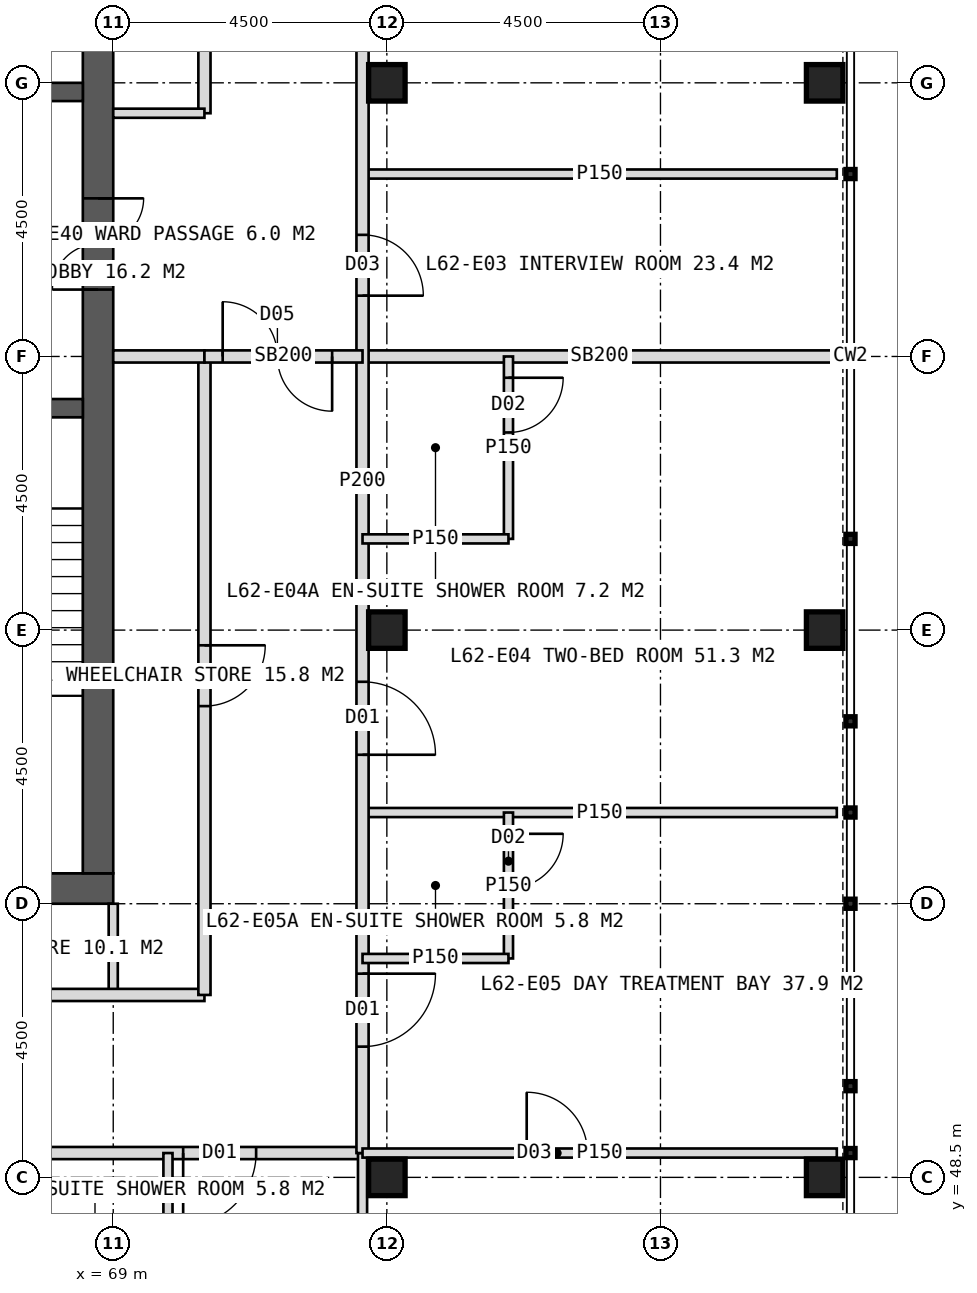
"""IFC4 building model, lengths in metres.
Left out: names, types, materials, properties, quantities, classifications, styles, units other than length and angle.
Written with IfcOpenShell. Run it as: python <this file> out.ifc"""

import sys

from ifc_helpers import new_model, si_unit, direction, frame, frame_2d, origin, origin_2d, place, context, subcontext, project, spatial, rectangle, hollow_rectangle, extrude, element, fill, save


model = new_model("IFC4")
c1 = context("Model", 3, precision=1e-05, world=origin(), true_north=direction((0.0, 1.0)))
c2 = subcontext(c1, "Body", "Model", "MODEL_VIEW")
j1 = project(units=[si_unit("LENGTHUNIT", "METRE"), si_unit("PLANEANGLEUNIT", "RADIAN")], contexts=[c1])
p1 = place(None, origin())
s1 = spatial("IfcSite", under=j1, at=p1, CompositionType="ELEMENT")
p2 = place(p1, origin())
s2 = spatial("IfcBuilding", under=s1, at=p2, CompositionType="ELEMENT")
p3 = place(p2, frame((0.0, 0.0, 258.0)))
s3 = spatial("IfcBuildingStorey", under=s2, at=p3, CompositionType="ELEMENT", Elevation=258.0)
p4 = place(p3, frame((51.0, 53.25, 0.0), z_axis=(0.0, 0.0, 1.0), x_axis=(1.0, 0.0, 0.0)))
e1 = element("IfcWall", 1, at=p4, inside=s3, PredefinedType="SHEAR", context=c2, shape_type="SweptSolid", body=[
    extrude(rectangle(XDim=18.0, YDim=0.5, at=frame_2d((9.0, 0.0))), origin(), (0.0, 0.0, 1.0), 4.0),
])
p5 = place(p4, frame((8.1, 0.0, 0.0)))
e2 = element("IfcOpeningElement", 2, at=p5, cuts=e1, PredefinedType="OPENING", context=c2, shape_type="SweptSolid", body=[
    extrude(rectangle(XDim=1.8, YDim=2.2, at=frame_2d((0.9, 1.1))), frame((0.0, 0.26, 0.0), z_axis=(0.0, -1.0, 0.0), x_axis=(1.0, 0.0, 0.0)), (0.0, 0.0, 1.0), 0.52),
])
p6 = place(p3, frame((68.75, 53.5, 0.0), z_axis=(0.0, 0.0, 1.0), x_axis=(0.0, 1.0, 0.0)))
e3 = element("IfcWall", 3, at=p6, inside=s3, PredefinedType="SHEAR", context=c2, shape_type="SweptSolid", body=[
    extrude(rectangle(XDim=17.0, YDim=0.5, at=frame_2d((8.5, 0.0))), origin(), (0.0, 0.0, 1.0), 4.0),
])
p7 = place(p6, frame((9.6, 0.0, 0.0)))
e4 = element("IfcOpeningElement", 4, at=p7, cuts=e3, PredefinedType="OPENING", context=c2, shape_type="SweptSolid", body=[
    extrude(rectangle(XDim=1.5, YDim=2.2, at=frame_2d((0.75, 1.1))), frame((0.0, 0.26, 0.0), z_axis=(0.0, -1.0, 0.0), x_axis=(1.0, 0.0, 0.0)), (0.0, 0.0, 1.0), 0.52),
])
p8 = place(p3, frame((65.2, 61.15, 0.0), z_axis=(0.0, 0.0, 1.0), x_axis=(1.0, 0.0, 0.0)))
e5 = element("IfcWall", 5, at=p8, inside=s3, PredefinedType="SHEAR", context=c2, shape_type="SweptSolid", body=[
    extrude(rectangle(XDim=3.3, YDim=0.3, at=frame_2d((1.65, 0.0))), origin(), (0.0, 0.0, 1.0), 4.0),
])
p9 = place(p8, frame((1.05, 0.0, 0.0)))
e6 = element("IfcOpeningElement", 6, at=p9, cuts=e5, PredefinedType="OPENING", context=c2, shape_type="SweptSolid", body=[
    extrude(rectangle(XDim=1.2, YDim=2.1, at=frame_2d((0.6, 1.05))), frame((0.0, 0.16, 0.0), z_axis=(0.0, -1.0, 0.0), x_axis=(1.0, 0.0, 0.0)), (0.0, 0.0, 1.0), 0.32),
])
p10 = place(p3, frame((65.2, 66.35, 0.0), z_axis=(0.0, 0.0, 1.0), x_axis=(1.0, 0.0, 0.0)))
e7 = element("IfcWall", 7, at=p10, inside=s3, PredefinedType="SHEAR", context=c2, shape_type="SweptSolid", body=[
    extrude(rectangle(XDim=3.3, YDim=0.3, at=frame_2d((1.65, 0.0))), origin(), (0.0, 0.0, 1.0), 4.0),
])
p11 = place(p10, frame((1.05, 0.0, 0.0)))
e8 = element("IfcOpeningElement", 8, at=p11, cuts=e7, PredefinedType="OPENING", context=c2, shape_type="SweptSolid", body=[
    extrude(rectangle(XDim=1.2, YDim=2.2, at=frame_2d((0.6, 1.1))), frame((0.0, 0.16, 0.0), z_axis=(0.0, -1.0, 0.0), x_axis=(1.0, 0.0, 0.0)), (0.0, 0.0, 1.0), 0.32),
])
for number, where, z_axis, x_axis in (
    (9, (73.5, 48.5, 0.0), (0.0, 0.0, 1.0), (1.0, 0.0, 0.0)),
    (10, (73.5, 57.5, 0.0), (0.0, 0.0, 1.0), (1.0, 0.0, 0.0)),
    (11, (73.5, 66.5, 0.0), (0.0, 0.0, 1.0), (1.0, 0.0, 0.0)),
    (12, (80.7, 48.5, 0.0), (0.0, 0.0, 1.0), (1.0, 0.0, 0.0)),
    (13, (80.7, 57.5, 0.0), (0.0, 0.0, 1.0), (1.0, 0.0, 0.0)),
    (14, (80.7, 66.5, 0.0), (0.0, 0.0, 1.0), (1.0, 0.0, 0.0)),
):
    element("IfcColumn", number, at=place(p3, frame(where, z_axis=z_axis, x_axis=x_axis)), inside=s3, PredefinedType="COLUMN", context=c2, shape_type="SweptSolid", body=[
        extrude(hollow_rectangle(XDim=0.6, YDim=0.6, WallThickness=0.04, at=origin_2d()), origin(), (0.0, 0.0, 1.0), 4.0),
    ])
p12 = place(p3, frame((73.1, 48.9, 0.0), z_axis=(0.0, 0.0, 1.0), x_axis=(-1.0, 0.0, 0.0)))
e15 = element("IfcWall", 15, at=p12, inside=s3, PredefinedType="PARTITIONING", context=c2, shape_type="SweptSolid", body=[
    extrude(rectangle(XDim=26.2, YDim=0.2, at=frame_2d((13.1, 0.0))), origin(), (0.0, 0.0, 1.0), 3.75),
])
p13 = place(p12, frame((1.75, 0.0, 0.0)))
e16 = element("IfcOpeningElement", 16, at=p13, cuts=e15, PredefinedType="OPENING", context=c2, shape_type="SweptSolid", body=[
    extrude(rectangle(XDim=1.2, YDim=2.2, at=frame_2d((0.6, 1.1))), frame((0.0, 0.11, 0.0), z_axis=(0.0, -1.0, 0.0), x_axis=(1.0, 0.0, 0.0)), (0.0, 0.0, 1.0), 0.22),
])
p14 = place(p12, frame((6.75, 0.0, 0.0)))
e17 = element("IfcOpeningElement", 17, at=p14, cuts=e15, PredefinedType="OPENING", context=c2, shape_type="SweptSolid", body=[
    extrude(rectangle(XDim=1.0, YDim=2.1, at=frame_2d((0.5, 1.05))), frame((0.0, 0.11, 0.0), z_axis=(0.0, -1.0, 0.0), x_axis=(1.0, 0.0, 0.0)), (0.0, 0.0, 1.0), 0.22),
])
p15 = place(p12, frame((11.1, 0.0, 0.0)))
e18 = element("IfcOpeningElement", 18, at=p15, cuts=e15, PredefinedType="OPENING", context=c2, shape_type="SweptSolid", body=[
    extrude(rectangle(XDim=1.0, YDim=2.1, at=frame_2d((0.5, 1.05))), frame((0.0, 0.11, 0.0), z_axis=(0.0, -1.0, 0.0), x_axis=(1.0, 0.0, 0.0)), (0.0, 0.0, 1.0), 0.22),
])
p16 = place(p12, frame((14.1, 0.0, 0.0)))
e19 = element("IfcOpeningElement", 19, at=p16, cuts=e15, PredefinedType="OPENING", context=c2, shape_type="SweptSolid", body=[
    extrude(rectangle(XDim=1.0, YDim=2.1, at=frame_2d((0.5, 1.05))), frame((0.0, 0.11, 0.0), z_axis=(0.0, -1.0, 0.0), x_axis=(1.0, 0.0, 0.0)), (0.0, 0.0, 1.0), 0.22),
])
p17 = place(p12, frame((18.45, 0.0, 0.0)))
e20 = element("IfcOpeningElement", 20, at=p17, cuts=e15, PredefinedType="OPENING", context=c2, shape_type="SweptSolid", body=[
    extrude(rectangle(XDim=1.0, YDim=2.1, at=frame_2d((0.5, 1.05))), frame((0.0, 0.11, 0.0), z_axis=(0.0, -1.0, 0.0), x_axis=(1.0, 0.0, 0.0)), (0.0, 0.0, 1.0), 0.22),
])
p18 = place(p12, frame((22.9, 0.0, 0.0)))
e21 = element("IfcOpeningElement", 21, at=p18, cuts=e15, PredefinedType="OPENING", context=c2, shape_type="SweptSolid", body=[
    extrude(rectangle(XDim=1.0, YDim=2.1, at=frame_2d((0.5, 1.05))), frame((0.0, 0.11, 0.0), z_axis=(0.0, -1.0, 0.0), x_axis=(1.0, 0.0, 0.0)), (0.0, 0.0, 1.0), 0.22),
])
p19 = place(p3, frame((73.1, 48.9, 0.0), z_axis=(0.0, 0.0, 1.0), x_axis=(0.0, -1.0, 0.0)))
e22 = element("IfcWall", 22, at=p19, inside=s3, PredefinedType="PARTITIONING", context=c2, shape_type="SweptSolid", body=[
    extrude(rectangle(XDim=7.8, YDim=0.15, at=frame_2d((3.9, 0.0))), origin(), (0.0, 0.0, 1.0), 3.75),
])
p20 = place(p3, frame((69.9, 48.9, 0.0), z_axis=(0.0, 0.0, 1.0), x_axis=(0.0, -1.0, 0.0)))
e23 = element("IfcWall", 23, at=p20, inside=s3, PredefinedType="PARTITIONING", context=c2, shape_type="SweptSolid", body=[
    extrude(rectangle(XDim=2.4, YDim=0.15, at=frame_2d((1.2, 0.0))), origin(), (0.0, 0.0, 1.0), 3.75),
])
p21 = place(p3, frame((69.0, 53.0, 0.0), z_axis=(0.0, 0.0, 1.0), x_axis=(0.0, -1.0, 0.0)))
e24 = element("IfcWall", 24, at=p21, inside=s3, PredefinedType="PARTITIONING", context=c2, shape_type="SweptSolid", body=[
    extrude(rectangle(XDim=1.5, YDim=0.15, at=frame_2d((0.75, 0.0))), origin(), (0.0, 0.0, 1.0), 3.75),
])
p22 = place(p3, frame((70.5, 51.5, 0.0), z_axis=(0.0, 0.0, 1.0), x_axis=(-1.0, 0.0, 0.0)))
e25 = element("IfcWall", 25, at=p22, inside=s3, PredefinedType="PARTITIONING", context=c2, shape_type="SweptSolid", body=[
    extrude(rectangle(XDim=8.25, YDim=0.2, at=frame_2d((4.125, 0.0))), origin(), (0.0, 0.0, 1.0), 3.75),
])
p23 = place(p22, frame((4.375, 0.0, 0.0)))
e26 = element("IfcOpeningElement", 26, at=p23, cuts=e25, PredefinedType="OPENING", context=c2, shape_type="SweptSolid", body=[
    extrude(rectangle(XDim=1.0, YDim=2.1, at=frame_2d((0.5, 1.05))), frame((0.0, 0.11, 0.0), z_axis=(0.0, -1.0, 0.0), x_axis=(1.0, 0.0, 0.0)), (0.0, 0.0, 1.0), 0.22),
])
p24 = place(p3, frame((73.1, 65.0, 0.0), z_axis=(0.0, 0.0, 1.0), x_axis=(1.0, 0.0, 0.0)))
e27 = element("IfcWall", 27, at=p24, inside=s3, PredefinedType="PARTITIONING", context=c2, shape_type="SweptSolid", body=[
    extrude(rectangle(XDim=7.8, YDim=0.15, at=frame_2d((3.9, 0.0))), origin(), (0.0, 0.0, 1.0), 3.75),
])
p25 = place(p3, frame((73.1, 62.0, 0.0), z_axis=(0.0, 0.0, 1.0), x_axis=(1.0, 0.0, 0.0)))
e28 = element("IfcWall", 28, at=p25, inside=s3, PredefinedType="SOLIDWALL", context=c2, shape_type="SweptSolid", body=[
    extrude(rectangle(XDim=7.8, YDim=0.2, at=frame_2d((3.9, 0.0))), origin(), (0.0, 0.0, 1.0), 2.75),
])
p26 = place(p3, frame((73.1, 54.5, 0.0), z_axis=(0.0, 0.0, 1.0), x_axis=(1.0, 0.0, 0.0)))
e29 = element("IfcWall", 29, at=p26, inside=s3, PredefinedType="PARTITIONING", context=c2, shape_type="SweptSolid", body=[
    extrude(rectangle(XDim=7.8, YDim=0.15, at=frame_2d((3.9, 0.0))), origin(), (0.0, 0.0, 1.0), 3.75),
])
p27 = place(p3, frame((73.1, 71.0, 0.0), z_axis=(0.0, 0.0, 1.0), x_axis=(0.0, -1.0, 0.0)))
e30 = element("IfcWall", 30, at=p27, inside=s3, PredefinedType="PARTITIONING", context=c2, shape_type="SweptSolid", body=[
    extrude(rectangle(XDim=22.1, YDim=0.2, at=frame_2d((11.05, 0.0))), origin(), (0.0, 0.0, 1.0), 3.75),
])
p28 = place(p27, frame((2.65, 0.0, 0.0)))
e31 = element("IfcOpeningElement", 31, at=p28, cuts=e30, PredefinedType="OPENING", context=c2, shape_type="SweptSolid", body=[
    extrude(rectangle(XDim=1.0, YDim=2.1, at=frame_2d((0.5, 1.05))), frame((0.0, 0.11, 0.0), z_axis=(0.0, -1.0, 0.0), x_axis=(1.0, 0.0, 0.0)), (0.0, 0.0, 1.0), 0.22),
])
p29 = place(p27, frame((7.0, 0.0, 0.0)))
e32 = element("IfcOpeningElement", 32, at=p29, cuts=e30, PredefinedType="OPENING", context=c2, shape_type="SweptSolid", body=[
    extrude(rectangle(XDim=1.0, YDim=2.1, at=frame_2d((0.5, 1.05))), frame((0.0, 0.11, 0.0), z_axis=(0.0, -1.0, 0.0), x_axis=(1.0, 0.0, 0.0)), (0.0, 0.0, 1.0), 0.22),
])
p30 = place(p27, frame((14.35, 0.0, 0.0)))
e33 = element("IfcOpeningElement", 33, at=p30, cuts=e30, PredefinedType="OPENING", context=c2, shape_type="SweptSolid", body=[
    extrude(rectangle(XDim=1.2, YDim=2.2, at=frame_2d((0.6, 1.1))), frame((0.0, 0.11, 0.0), z_axis=(0.0, -1.0, 0.0), x_axis=(1.0, 0.0, 0.0)), (0.0, 0.0, 1.0), 0.22),
])
p31 = place(p27, frame((19.15, 0.0, 0.0)))
e34 = element("IfcOpeningElement", 34, at=p31, cuts=e30, PredefinedType="OPENING", context=c2, shape_type="SweptSolid", body=[
    extrude(rectangle(XDim=1.2, YDim=2.2, at=frame_2d((0.6, 1.1))), frame((0.0, 0.11, 0.0), z_axis=(0.0, -1.0, 0.0), x_axis=(1.0, 0.0, 0.0)), (0.0, 0.0, 1.0), 0.22),
])
p32 = place(p3, frame((75.5, 62.0, 0.0), z_axis=(0.0, 0.0, 1.0), x_axis=(0.0, -1.0, 0.0)))
e35 = element("IfcWall", 35, at=p32, inside=s3, PredefinedType="PARTITIONING", context=c2, shape_type="SweptSolid", body=[
    extrude(rectangle(XDim=3.0, YDim=0.15, at=frame_2d((1.5, 0.0))), origin(), (0.0, 0.0, 1.0), 3.75),
])
p33 = place(p32, frame((0.35, 0.0, 0.0)))
e36 = element("IfcOpeningElement", 36, at=p33, cuts=e35, PredefinedType="OPENING", context=c2, shape_type="SweptSolid", body=[
    extrude(rectangle(XDim=0.9, YDim=2.1, at=frame_2d((0.45, 1.05))), frame((0.0, 0.085, 0.0), z_axis=(0.0, -1.0, 0.0), x_axis=(1.0, 0.0, 0.0)), (0.0, 0.0, 1.0), 0.17),
])
p34 = place(p3, frame((73.1, 59.0, 0.0), z_axis=(0.0, 0.0, 1.0), x_axis=(1.0, 0.0, 0.0)))
e37 = element("IfcWall", 37, at=p34, inside=s3, PredefinedType="PARTITIONING", context=c2, shape_type="SweptSolid", body=[
    extrude(rectangle(XDim=2.4, YDim=0.15, at=frame_2d((1.2, 0.0))), origin(), (0.0, 0.0, 1.0), 3.75),
])
p35 = place(p3, frame((73.1, 48.9, 0.0), z_axis=(0.0, 0.0, 1.0), x_axis=(1.0, 0.0, 0.0)))
e38 = element("IfcWall", 38, at=p35, inside=s3, PredefinedType="PARTITIONING", context=c2, shape_type="SweptSolid", body=[
    extrude(rectangle(XDim=7.8, YDim=0.15, at=frame_2d((3.9, 0.0))), origin(), (0.0, 0.0, 1.0), 3.75),
])
p36 = place(p35, frame((2.7, 0.0, 0.0)))
e39 = element("IfcOpeningElement", 39, at=p36, cuts=e38, PredefinedType="OPENING", context=c2, shape_type="SweptSolid", body=[
    extrude(rectangle(XDim=1.0, YDim=2.1, at=frame_2d((0.5, 1.05))), frame((0.0, 0.085, 0.0), z_axis=(0.0, -1.0, 0.0), x_axis=(1.0, 0.0, 0.0)), (0.0, 0.0, 1.0), 0.17),
])
p37 = place(p3, frame((75.5, 54.5, 0.0), z_axis=(0.0, 0.0, 1.0), x_axis=(0.0, -1.0, 0.0)))
e40 = element("IfcWall", 40, at=p37, inside=s3, PredefinedType="PARTITIONING", context=c2, shape_type="SweptSolid", body=[
    extrude(rectangle(XDim=2.4, YDim=0.15, at=frame_2d((1.2, 0.0))), origin(), (0.0, 0.0, 1.0), 3.75),
])
p38 = place(p37, frame((0.35, 0.0, 0.0)))
e41 = element("IfcOpeningElement", 41, at=p38, cuts=e40, PredefinedType="OPENING", context=c2, shape_type="SweptSolid", body=[
    extrude(rectangle(XDim=0.9, YDim=2.1, at=frame_2d((0.45, 1.05))), frame((0.0, 0.085, 0.0), z_axis=(0.0, -1.0, 0.0), x_axis=(1.0, 0.0, 0.0)), (0.0, 0.0, 1.0), 0.17),
])
p39 = place(p3, frame((73.1, 52.1, 0.0), z_axis=(0.0, 0.0, 1.0), x_axis=(1.0, 0.0, 0.0)))
e42 = element("IfcWall", 42, at=p39, inside=s3, PredefinedType="PARTITIONING", context=c2, shape_type="SweptSolid", body=[
    extrude(rectangle(XDim=2.4, YDim=0.15, at=frame_2d((1.2, 0.0))), origin(), (0.0, 0.0, 1.0), 3.75),
])
p40 = place(p3, frame((70.5, 72.5, 0.0), z_axis=(0.0, 0.0, 1.0), x_axis=(0.0, -1.0, 0.0)))
e43 = element("IfcWall", 43, at=p40, inside=s3, PredefinedType="PARTITIONING", context=c2, shape_type="SweptSolid", body=[
    extrude(rectangle(XDim=6.5, YDim=0.2, at=frame_2d((3.25, 0.0))), origin(), (0.0, 0.0, 1.0), 3.75),
])
p41 = place(p40, frame((3.5, 0.0, 0.0)))
e44 = element("IfcOpeningElement", 44, at=p41, cuts=e43, PredefinedType="OPENING", context=c2, shape_type="SweptSolid", body=[
    extrude(rectangle(XDim=1.0, YDim=2.1, at=frame_2d((0.5, 1.05))), frame((0.0, 0.11, 0.0), z_axis=(0.0, -1.0, 0.0), x_axis=(1.0, 0.0, 0.0)), (0.0, 0.0, 1.0), 0.22),
])
p42 = place(p3, frame((70.5, 62.0, 0.0), z_axis=(0.0, 0.0, 1.0), x_axis=(0.0, -1.0, 0.0)))
e45 = element("IfcWall", 45, at=p42, inside=s3, PredefinedType="PARTITIONING", context=c2, shape_type="SweptSolid", body=[
    extrude(rectangle(XDim=10.5, YDim=0.2, at=frame_2d((5.25, 0.0))), origin(), (0.0, 0.0, 1.0), 3.75),
])
p43 = place(p42, frame((4.75, 0.0, 0.0)))
e46 = element("IfcOpeningElement", 46, at=p43, cuts=e45, PredefinedType="OPENING", context=c2, shape_type="SweptSolid", body=[
    extrude(rectangle(XDim=1.0, YDim=2.1, at=frame_2d((0.5, 1.05))), frame((0.0, 0.11, 0.0), z_axis=(0.0, -1.0, 0.0), x_axis=(1.0, 0.0, 0.0)), (0.0, 0.0, 1.0), 0.22),
])
p44 = place(p3, frame((69.0, 66.0, 0.0), z_axis=(0.0, 0.0, 1.0), x_axis=(1.0, 0.0, 0.0)))
e47 = element("IfcWall", 47, at=p44, inside=s3, PredefinedType="PARTITIONING", context=c2, shape_type="SweptSolid", body=[
    extrude(rectangle(XDim=1.5, YDim=0.15, at=frame_2d((0.75, 0.0))), origin(), (0.0, 0.0, 1.0), 3.75),
])
p45 = place(p3, frame((69.0, 62.0, 0.0), z_axis=(0.0, 0.0, 1.0), x_axis=(1.0, 0.0, 0.0)))
e48 = element("IfcWall", 48, at=p45, inside=s3, PredefinedType="SOLIDWALL", context=c2, shape_type="SweptSolid", body=[
    extrude(rectangle(XDim=1.5, YDim=0.2, at=frame_2d((0.75, 0.0))), origin(), (0.0, 0.0, 1.0), 2.75),
])
p46 = place(p3, frame((70.5, 62.0, 0.0), z_axis=(0.0, 0.0, 1.0), x_axis=(1.0, 0.0, 0.0)))
e49 = element("IfcWall", 49, at=p46, inside=s3, PredefinedType="SOLIDWALL", context=c2, shape_type="SweptSolid", body=[
    extrude(rectangle(XDim=2.6, YDim=0.2, at=frame_2d((1.3, 0.0))), origin(), (0.0, 0.0, 1.0), 2.75),
])
p47 = place(p46, frame((0.3, 0.0, 0.0)))
e50 = element("IfcOpeningElement", 50, at=p47, cuts=e49, PredefinedType="OPENING", context=c2, shape_type="SweptSolid", body=[
    extrude(rectangle(XDim=1.8, YDim=2.2, at=frame_2d((0.9, 1.1))), frame((0.0, 0.11, 0.0), z_axis=(0.0, -1.0, 0.0), x_axis=(1.0, 0.0, 0.0)), (0.0, 0.0, 1.0), 0.22),
])
p48 = place(p13, origin())
e51 = element("IfcDoor", 51, at=p48, inside=s3, OperationType="SINGLE_SWING_RIGHT", PredefinedType="DOOR", context=c2, shape_type="SweptSolid", body=[
    extrude(rectangle(XDim=1.2, YDim=2.2, at=frame_2d((0.6, 1.1))), frame((0.0, 0.025, 0.0), z_axis=(0.0, -1.0, 0.0), x_axis=(1.0, 0.0, 0.0)), (0.0, 0.0, 1.0), 0.05),
])
fill(e16, e51)
p49 = place(p29, origin())
e52 = element("IfcDoor", 52, at=p49, inside=s3, OperationType="SINGLE_SWING_RIGHT", PredefinedType="DOOR", context=c2, shape_type="SweptSolid", body=[
    extrude(rectangle(XDim=1.0, YDim=2.1, at=frame_2d((0.5, 1.05))), frame((0.0, 0.025, 0.0), z_axis=(0.0, -1.0, 0.0), x_axis=(1.0, 0.0, 0.0)), (0.0, 0.0, 1.0), 0.05),
])
fill(e32, e52)
p50 = place(p30, origin())
e53 = element("IfcDoor", 53, at=p50, inside=s3, OperationType="SINGLE_SWING_RIGHT", PredefinedType="DOOR", context=c2, shape_type="SweptSolid", body=[
    extrude(rectangle(XDim=1.2, YDim=2.2, at=frame_2d((0.6, 1.1))), frame((0.0, 0.025, 0.0), z_axis=(0.0, -1.0, 0.0), x_axis=(1.0, 0.0, 0.0)), (0.0, 0.0, 1.0), 0.05),
])
fill(e33, e53)
p51 = place(p33, origin())
e54 = element("IfcDoor", 54, at=p51, inside=s3, OperationType="SINGLE_SWING_LEFT", PredefinedType="DOOR", context=c2, shape_type="SweptSolid", body=[
    extrude(rectangle(XDim=0.9, YDim=2.1, at=frame_2d((0.45, 1.05))), frame((0.0, 0.025, 0.0), z_axis=(0.0, -1.0, 0.0), x_axis=(1.0, 0.0, 0.0)), (0.0, 0.0, 1.0), 0.05),
])
fill(e36, e54)
p52 = place(p36, origin())
e55 = element("IfcDoor", 55, at=p52, inside=s3, OperationType="SINGLE_SWING_LEFT", PredefinedType="DOOR", context=c2, shape_type="SweptSolid", body=[
    extrude(rectangle(XDim=1.0, YDim=2.1, at=frame_2d((0.5, 1.05))), frame((0.0, 0.025, 0.0), z_axis=(0.0, -1.0, 0.0), x_axis=(1.0, 0.0, 0.0)), (0.0, 0.0, 1.0), 0.05),
])
fill(e39, e55)
p53 = place(p31, origin())
e56 = element("IfcDoor", 56, at=p53, inside=s3, OperationType="SINGLE_SWING_LEFT", PredefinedType="DOOR", context=c2, shape_type="SweptSolid", body=[
    extrude(rectangle(XDim=1.2, YDim=2.2, at=frame_2d((0.6, 1.1))), frame((0.0, 0.025, 0.0), z_axis=(0.0, -1.0, 0.0), x_axis=(1.0, 0.0, 0.0)), (0.0, 0.0, 1.0), 0.05),
])
fill(e34, e56)
p54 = place(p38, origin())
e57 = element("IfcDoor", 57, at=p54, inside=s3, OperationType="SINGLE_SWING_LEFT", PredefinedType="DOOR", context=c2, shape_type="SweptSolid", body=[
    extrude(rectangle(XDim=0.9, YDim=2.1, at=frame_2d((0.45, 1.05))), frame((0.0, 0.025, 0.0), z_axis=(0.0, -1.0, 0.0), x_axis=(1.0, 0.0, 0.0)), (0.0, 0.0, 1.0), 0.05),
])
fill(e41, e57)
p55 = place(p43, origin())
e58 = element("IfcDoor", 58, at=p55, inside=s3, OperationType="SINGLE_SWING_LEFT", PredefinedType="DOOR", context=c2, shape_type="SweptSolid", body=[
    extrude(rectangle(XDim=1.0, YDim=2.1, at=frame_2d((0.5, 1.05))), frame((0.0, 0.025, 0.0), z_axis=(0.0, -1.0, 0.0), x_axis=(1.0, 0.0, 0.0)), (0.0, 0.0, 1.0), 0.05),
])
fill(e46, e58)
p56 = place(p47, origin())
e59 = element("IfcDoor", 59, at=p56, inside=s3, OperationType="DOUBLE_DOOR_DOUBLE_SWING", PredefinedType="DOOR", context=c2, shape_type="SweptSolid", body=[
    extrude(rectangle(XDim=1.8, YDim=2.2, at=frame_2d((0.9, 1.1))), frame((0.0, 0.025, 0.0), z_axis=(0.0, -1.0, 0.0), x_axis=(1.0, 0.0, 0.0)), (0.0, 0.0, 1.0), 0.05),
])
fill(e50, e59)
p57 = place(p7, origin())
e60 = element("IfcDoor", 60, at=p57, inside=s3, OperationType="DOUBLE_DOOR_SINGLE_SWING", PredefinedType="DOOR", context=c2, shape_type="SweptSolid", body=[
    extrude(rectangle(XDim=1.5, YDim=2.2, at=frame_2d((0.75, 1.1))), frame((0.0, 0.025, 0.0), z_axis=(0.0, -1.0, 0.0), x_axis=(1.0, 0.0, 0.0)), (0.0, 0.0, 1.0), 0.05),
])
fill(e4, e60)
save(model, sys.argv[1])
